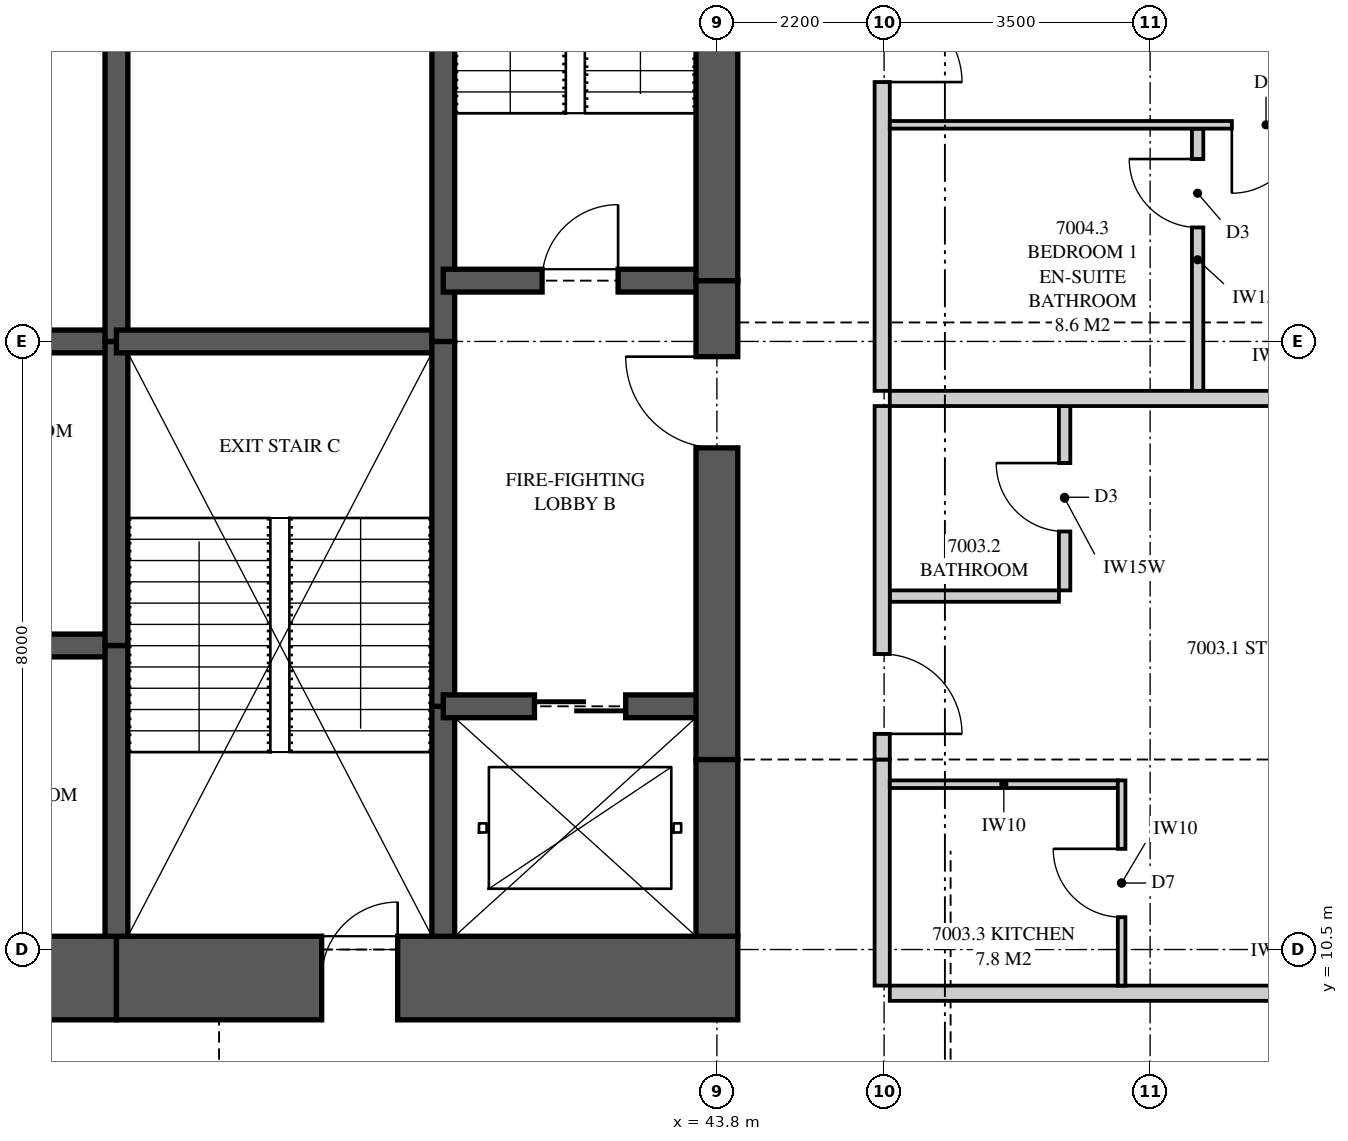
"""IFC4 building model, lengths in metres.
Left out: names, types, materials, properties, quantities, classifications, styles, units other than length and angle.
Written with IfcOpenShell. Run it as: python <this file> out.ifc"""

import sys

from ifc_helpers import new_model, si_unit, direction, frame, frame_2d, origin, place, context, subcontext, project, spatial, polyline, rectangle, outline, extrude, element, fill, save


model = new_model("IFC4")
c1 = context("Model", 3, precision=1e-05, world=origin(), true_north=direction((0.0, 1.0)))
c2 = subcontext(c1, "Body", "Model", "MODEL_VIEW")
j1 = project(units=[si_unit("LENGTHUNIT", "METRE"), si_unit("PLANEANGLEUNIT", "RADIAN")], contexts=[c1])
p1 = place(None, origin())
s1 = spatial("IfcSite", under=j1, at=p1, CompositionType="ELEMENT")
p2 = place(p1, origin())
s2 = spatial("IfcBuilding", under=s1, at=p2, CompositionType="ELEMENT")
p3 = place(p2, frame((0.0, 0.0, 256.45)))
s3 = spatial("IfcBuildingStorey", under=s2, at=p3, CompositionType="ELEMENT", Elevation=256.45)
p4 = place(p3, frame((31.6, 10.125, 0.0), z_axis=(0.0, 0.0, 1.0), x_axis=(1.0, 0.0, 0.0)))
e1 = element("IfcWall", 1, at=p4, inside=s3, PredefinedType="SHEAR", context=c2, shape_type="SweptSolid", body=[
    extrude(rectangle(XDim=4.3, YDim=1.1, at=frame_2d((2.15, 0.0))), origin(), (0.0, 0.0, 1.0), 3.5),
])
p5 = place(p3, frame((35.9, 10.125, 0.0), z_axis=(0.0, 0.0, 1.0), x_axis=(1.0, 0.0, 0.0)))
e2 = element("IfcWall", 2, at=p5, inside=s3, PredefinedType="SHEAR", context=c2, shape_type="SweptSolid", body=[
    extrude(rectangle(XDim=8.175, YDim=1.1, at=frame_2d((4.087, 0.0))), origin(), (0.0, 0.0, 1.0), 3.5),
])
p6 = place(p5, frame((2.7, 0.0, 0.0)))
e3 = element("IfcOpeningElement", 3, at=p6, cuts=e2, PredefinedType="OPENING", context=c2, shape_type="SweptSolid", body=[
    extrude(rectangle(XDim=1.0, YDim=2.1, at=frame_2d((0.5, 1.05))), frame((0.0, 0.56, 0.0), z_axis=(0.0, -1.0, 0.0), x_axis=(1.0, 0.0, 0.0)), (0.0, 0.0, 1.0), 1.12),
])
p7 = place(p3, frame((43.8, 10.675, 0.0), z_axis=(0.0, 0.0, 1.0), x_axis=(0.0, 1.0, 0.0)))
e4 = element("IfcWall", 4, at=p7, inside=s3, PredefinedType="SHEAR", context=c2, shape_type="SweptSolid", body=[
    extrude(rectangle(XDim=2.325, YDim=0.55, at=frame_2d((1.163, 0.0))), origin(), (0.0, 0.0, 1.0), 3.5),
])
p8 = place(p3, frame((43.8, 13.0, 0.0), z_axis=(0.0, 0.0, 1.0), x_axis=(0.0, 1.0, 0.0)))
e5 = element("IfcWall", 5, at=p8, inside=s3, PredefinedType="SHEAR", context=c2, shape_type="SweptSolid", body=[
    extrude(rectangle(XDim=6.3, YDim=0.55, at=frame_2d((3.15, 0.0))), origin(), (0.0, 0.0, 1.0), 3.5),
])
p9 = place(p8, frame((4.1, 0.0, 0.0)))
e6 = element("IfcOpeningElement", 6, at=p9, cuts=e5, PredefinedType="OPENING", context=c2, shape_type="SweptSolid", body=[
    extrude(rectangle(XDim=1.2, YDim=2.2, at=frame_2d((0.6, 1.1))), frame((0.0, 0.285, 0.0), z_axis=(0.0, -1.0, 0.0), x_axis=(1.0, 0.0, 0.0)), (0.0, 0.0, 1.0), 0.57),
])
p10 = place(p3, frame((43.8, 19.3, 0.0), z_axis=(0.0, 0.0, 1.0), x_axis=(0.0, 1.0, 0.0)))
e7 = element("IfcWall", 7, at=p10, inside=s3, PredefinedType="SHEAR", context=c2, shape_type="SweptSolid", body=[
    extrude(rectangle(XDim=7.025, YDim=0.55, at=frame_2d((3.512, 0.0))), origin(), (0.0, 0.0, 1.0), 3.5),
])
p11 = place(p3, frame((35.9, 10.675, 0.0), z_axis=(0.0, 0.0, 1.0), x_axis=(0.0, 1.0, 0.0)))
e8 = element("IfcWall", 8, at=p11, inside=s3, PredefinedType="SHEAR", context=c2, shape_type="SweptSolid", body=[
    extrude(rectangle(XDim=3.825, YDim=0.3, at=frame_2d((1.913, 0.0))), origin(), (0.0, 0.0, 1.0), 3.5),
])
for number, where, z_axis, x_axis in (
    (9, (35.9, 14.5, 0.0), (0.0, 0.0, 1.0), (0.0, 1.0, 0.0)),
    (10, (35.9, 18.5, 0.0), (0.0, 0.0, 1.0), (0.0, 1.0, 0.0)),
):
    element("IfcWall", number, at=place(p3, frame(where, z_axis=z_axis, x_axis=x_axis)), inside=s3, PredefinedType="SHEAR", context=c2, shape_type="SweptSolid", body=[
        extrude(rectangle(XDim=4.0, YDim=0.3, at=frame_2d((2.0, 0.0))), origin(), (0.0, 0.0, 1.0), 3.5),
    ])
p12 = place(p3, frame((40.2, 10.675, 0.0), z_axis=(0.0, 0.0, 1.0), x_axis=(0.0, 1.0, 0.0)))
e11 = element("IfcWall", 11, at=p12, inside=s3, PredefinedType="SHEAR", context=c2, shape_type="SweptSolid", body=[
    extrude(rectangle(XDim=3.025, YDim=0.3, at=frame_2d((1.512, 0.0))), origin(), (0.0, 0.0, 1.0), 3.5),
])
p13 = place(p3, frame((40.2, 13.7, 0.0), z_axis=(0.0, 0.0, 1.0), x_axis=(0.0, 1.0, 0.0)))
e12 = element("IfcWall", 12, at=p13, inside=s3, PredefinedType="SHEAR", context=c2, shape_type="SweptSolid", body=[
    extrude(rectangle(XDim=4.8, YDim=0.3, at=frame_2d((2.4, 0.0))), origin(), (0.0, 0.0, 1.0), 3.5),
])
p14 = place(p3, frame((40.2, 18.5, 0.0), z_axis=(0.0, 0.0, 1.0), x_axis=(0.0, 1.0, 0.0)))
e13 = element("IfcWall", 13, at=p14, inside=s3, PredefinedType="SHEAR", context=c2, shape_type="SweptSolid", body=[
    extrude(rectangle(XDim=7.825, YDim=0.3, at=frame_2d((3.913, 0.0))), origin(), (0.0, 0.0, 1.0), 3.5),
])
for number, where, z_axis, x_axis in (
    (14, (31.6, 14.5, 0.0), (0.0, 0.0, 1.0), (1.0, 0.0, 0.0)),
    (15, (31.6, 18.5, 0.0), (0.0, 0.0, 1.0), (1.0, 0.0, 0.0)),
):
    element("IfcWall", number, at=place(p3, frame(where, z_axis=z_axis, x_axis=x_axis)), inside=s3, PredefinedType="SHEAR", context=c2, shape_type="SweptSolid", body=[
        extrude(rectangle(XDim=4.3, YDim=0.3, at=frame_2d((2.15, 0.0))), origin(), (0.0, 0.0, 1.0), 3.5),
    ])
p15 = place(p3, frame((35.9, 18.5, 0.0), z_axis=(0.0, 0.0, 1.0), x_axis=(1.0, 0.0, 0.0)))
e16 = element("IfcWall", 16, at=p15, inside=s3, PredefinedType="SHEAR", context=c2, shape_type="SweptSolid", body=[
    extrude(rectangle(XDim=4.3, YDim=0.3, at=frame_2d((2.15, 0.0))), origin(), (0.0, 0.0, 1.0), 3.5),
])
p16 = place(p3, frame((40.2, 13.7, 0.0), z_axis=(0.0, 0.0, 1.0), x_axis=(1.0, 0.0, 0.0)))
e17 = element("IfcWall", 17, at=p16, inside=s3, PredefinedType="SHEAR", context=c2, shape_type="SweptSolid", body=[
    extrude(rectangle(XDim=3.6, YDim=0.3, at=frame_2d((1.8, 0.0))), origin(), (0.0, 0.0, 1.0), 3.5),
])
p17 = place(p16, frame((1.2, 0.0, 0.0)))
e18 = element("IfcOpeningElement", 18, at=p17, cuts=e17, PredefinedType="OPENING", context=c2, shape_type="SweptSolid", body=[
    extrude(rectangle(XDim=1.2, YDim=2.1, at=frame_2d((0.6, 1.05))), frame((0.0, 0.16, 0.0), z_axis=(0.0, -1.0, 0.0), x_axis=(1.0, 0.0, 0.0)), (0.0, 0.0, 1.0), 0.32),
])
p18 = place(p3, frame((40.2, 19.3, 0.0), z_axis=(0.0, 0.0, 1.0), x_axis=(1.0, 0.0, 0.0)))
e19 = element("IfcWall", 19, at=p18, inside=s3, PredefinedType="SHEAR", context=c2, shape_type="SweptSolid", body=[
    extrude(rectangle(XDim=3.6, YDim=0.3, at=frame_2d((1.8, 0.0))), origin(), (0.0, 0.0, 1.0), 3.5),
])
p19 = place(p18, frame((1.3, 0.0, 0.0)))
e20 = element("IfcOpeningElement", 20, at=p19, cuts=e19, PredefinedType="OPENING", context=c2, shape_type="SweptSolid", body=[
    extrude(rectangle(XDim=1.0, YDim=2.1, at=frame_2d((0.5, 1.05))), frame((0.0, 0.16, 0.0), z_axis=(0.0, -1.0, 0.0), x_axis=(1.0, 0.0, 0.0)), (0.0, 0.0, 1.0), 0.32),
])
p20 = place(p3, frame((46.075, 9.925, 0.0), z_axis=(0.0, 0.0, 1.0), x_axis=(1.0, 0.0, 0.0)))
e21 = element("IfcWall", 21, at=p20, inside=s3, PredefinedType="PARTITIONING", context=c2, shape_type="SweptSolid", body=[
    extrude(outline(polyline([(0.0, 0.0), (10.25, 0.0), (10.25, 3.26), (10.033, 3.26), (10.033, 2.3), (8.201, 2.3), (8.201, 3.26), (2.11, 3.26), (2.11, 2.66), (0.0, 2.66), (0.0, 3.26), (0.0, 0.0)])), frame((0.0, 0.1, 0.0), z_axis=(0.0, -1.0, 0.0), x_axis=(1.0, 0.0, 0.0)), (0.0, 0.0, 1.0), 0.2),
])
p21 = place(p3, frame((56.325, 17.75, 0.0), z_axis=(0.0, 0.0, 1.0), x_axis=(-1.0, 0.0, 0.0)))
e22 = element("IfcWall", 22, at=p21, inside=s3, PredefinedType="PARTITIONING", context=c2, shape_type="SweptSolid", body=[
    extrude(outline(polyline([(0.0, 0.0), (10.25, 0.0), (10.25, 3.26), (10.25, 2.66), (1.685, 2.66), (1.685, 2.3), (0.0, 2.3), (0.0, 3.26), (0.0, 0.0)])), frame((0.0, 0.1, 0.0), z_axis=(0.0, -1.0, 0.0), x_axis=(1.0, 0.0, 0.0)), (0.0, 0.0, 1.0), 0.2),
])
p22 = place(p3, frame((45.975, 10.025, 0.0), z_axis=(0.0, 0.0, 1.0), x_axis=(0.0, 1.0, 0.0)))
e23 = element("IfcWall", 23, at=p22, inside=s3, PredefinedType="PARTITIONING", context=c2, shape_type="SweptSolid", body=[
    extrude(rectangle(XDim=2.975, YDim=0.2, at=frame_2d((1.488, 0.0))), origin(), (0.0, 0.0, 1.0), 2.66),
])
p23 = place(p3, frame((45.975, 13.0, 0.0), z_axis=(0.0, 0.0, 1.0), x_axis=(0.0, 1.0, 0.0)))
e24 = element("IfcWall", 24, at=p23, inside=s3, PredefinedType="PARTITIONING", context=c2, shape_type="SweptSolid", body=[
    extrude(outline(polyline([(0.0, 0.0), (4.65, 0.0), (4.65, 2.66), (4.44, 2.66), (4.44, 3.26), (1.31, 3.26), (1.31, 2.66), (0.0, 2.66), (0.0, 0.0)])), frame((0.0, 0.1, 0.0), z_axis=(0.0, -1.0, 0.0), x_axis=(1.0, 0.0, 0.0)), (0.0, 0.0, 1.0), 0.2),
])
p24 = place(p23, frame((0.337, 0.0, 0.0)))
e25 = element("IfcOpeningElement", 25, at=p24, cuts=e24, PredefinedType="OPENING", context=c2, shape_type="SweptSolid", body=[
    extrude(rectangle(XDim=1.05, YDim=2.2, at=frame_2d((0.525, 1.1))), frame((0.0, 0.11, 0.0), z_axis=(0.0, -1.0, 0.0), x_axis=(1.0, 0.0, 0.0)), (0.0, 0.0, 1.0), 0.22),
])
p25 = place(p3, frame((48.375, 15.225, 0.0), z_axis=(0.0, 0.0, 1.0), x_axis=(0.0, 1.0, 0.0)))
e26 = element("IfcWall", 26, at=p25, inside=s3, PredefinedType="PLUMBINGWALL", context=c2, shape_type="SweptSolid", body=[
    extrude(outline(polyline([(0.0, 0.0), (2.425, 0.0), (2.425, 3.26), (2.425, 2.66), (2.24, 2.66), (2.24, 3.26), (0.0, 3.26), (0.0, 0.0)])), frame((0.0, 0.075, 0.0), z_axis=(0.0, -1.0, 0.0), x_axis=(1.0, 0.0, 0.0)), (0.0, 0.0, 1.0), 0.15),
])
p26 = place(p25, frame((0.775, 0.0, 0.0)))
e27 = element("IfcOpeningElement", 27, at=p26, cuts=e26, PredefinedType="OPENING", context=c2, shape_type="SweptSolid", body=[
    extrude(rectangle(XDim=0.9, YDim=2.1, at=frame_2d((0.45, 1.05))), frame((0.0, 0.085, 0.0), z_axis=(0.0, -1.0, 0.0), x_axis=(1.0, 0.0, 0.0)), (0.0, 0.0, 1.0), 0.17),
])
p27 = place(p3, frame((48.3, 15.15, 0.0), z_axis=(0.0, 0.0, 1.0), x_axis=(-1.0, 0.0, 0.0)))
e28 = element("IfcWall", 28, at=p27, inside=s3, PredefinedType="PLUMBINGWALL", context=c2, shape_type="SweptSolid", body=[
    extrude(rectangle(XDim=2.225, YDim=0.15, at=frame_2d((1.113, 0.0))), origin(), (0.0, 0.0, 1.0), 3.26),
])
p28 = place(p3, frame((45.975, 17.85, 0.0), z_axis=(0.0, 0.0, 1.0), x_axis=(0.0, 1.0, 0.0)))
e29 = element("IfcWall", 29, at=p28, inside=s3, PredefinedType="PARTITIONING", context=c2, shape_type="SweptSolid", body=[
    extrude(outline(polyline([(0.0, 0.0), (7.15, 0.0), (7.15, 2.66), (5.84, 2.66), (5.84, 3.26), (2.21, 3.26), (2.21, 2.66), (0.0, 2.66), (0.0, 0.0)])), frame((0.0, 0.1, 0.0), z_axis=(0.0, -1.0, 0.0), x_axis=(1.0, 0.0, 0.0)), (0.0, 0.0, 1.0), 0.2),
])
p29 = place(p28, frame((4.062, 0.0, 0.0)))
e30 = element("IfcOpeningElement", 30, at=p29, cuts=e29, PredefinedType="OPENING", context=c2, shape_type="SweptSolid", body=[
    extrude(rectangle(XDim=1.05, YDim=2.2, at=frame_2d((0.525, 1.1))), frame((0.0, 0.11, 0.0), z_axis=(0.0, -1.0, 0.0), x_axis=(1.0, 0.0, 0.0)), (0.0, 0.0, 1.0), 0.22),
])
p30 = place(p3, frame((56.325, 21.35, 0.0), z_axis=(0.0, 0.0, 1.0), x_axis=(-1.0, 0.0, 0.0)))
e31 = element("IfcWall", 31, at=p30, inside=s3, PredefinedType="PARTITIONING", context=c2, shape_type="SweptSolid", body=[
    extrude(outline(polyline([(0.0, 0.0), (10.25, 0.0), (10.25, 3.26), (1.635, 3.26), (1.635, 2.3), (0.0, 2.3), (0.0, 3.26), (0.0, 0.0)])), frame((0.0, 0.05, 0.0), z_axis=(0.0, -1.0, 0.0), x_axis=(1.0, 0.0, 0.0)), (0.0, 0.0, 1.0), 0.1),
])
p31 = place(p30, frame((4.85, 0.0, 0.0)))
e32 = element("IfcOpeningElement", 32, at=p31, cuts=e31, PredefinedType="OPENING", context=c2, shape_type="SweptSolid", body=[
    extrude(rectangle(XDim=0.9, YDim=2.1, at=frame_2d((0.45, 1.05))), frame((0.0, 0.06, 0.0), z_axis=(0.0, -1.0, 0.0), x_axis=(1.0, 0.0, 0.0)), (0.0, 0.0, 1.0), 0.12),
])
p32 = place(p3, frame((50.125, 17.85, 0.0), z_axis=(0.0, 0.0, 1.0), x_axis=(0.0, 1.0, 0.0)))
e33 = element("IfcWall", 33, at=p32, inside=s3, PredefinedType="PLUMBINGWALL", context=c2, shape_type="SweptSolid", body=[
    extrude(outline(polyline([(0.0, 0.0), (3.45, 0.0), (3.45, 3.26), (2.185, 3.26), (2.185, 2.66), (0.0, 2.66), (0.0, 3.26), (0.0, 0.0)])), frame((0.0, 0.075, 0.0), z_axis=(0.0, -1.0, 0.0), x_axis=(1.0, 0.0, 0.0)), (0.0, 0.0, 1.0), 0.15),
])
p33 = place(p32, frame((2.15, 0.0, 0.0)))
e34 = element("IfcOpeningElement", 34, at=p33, cuts=e33, PredefinedType="OPENING", context=c2, shape_type="SweptSolid", body=[
    extrude(rectangle(XDim=0.9, YDim=2.1, at=frame_2d((0.45, 1.05))), frame((0.0, 0.085, 0.0), z_axis=(0.0, -1.0, 0.0), x_axis=(1.0, 0.0, 0.0)), (0.0, 0.0, 1.0), 0.17),
])
p34 = place(p3, frame((49.125, 10.025, 0.0), z_axis=(0.0, 0.0, 1.0), x_axis=(0.0, 1.0, 0.0)))
e35 = element("IfcWall", 35, at=p34, inside=s3, PredefinedType="PARTITIONING", context=c2, shape_type="SweptSolid", body=[
    extrude(outline(polyline([(0.0, 0.0), (2.7, 0.0), (2.7, 3.26), (2.7, 2.66), (1.715, 2.66), (1.715, 3.26), (0.0, 3.26), (0.0, 0.0)])), frame((0.0, 0.05, 0.0), z_axis=(0.0, -1.0, 0.0), x_axis=(1.0, 0.0, 0.0)), (0.0, 0.0, 1.0), 0.1),
])
p35 = place(p34, frame((0.9, 0.0, 0.0)))
e36 = element("IfcOpeningElement", 36, at=p35, cuts=e35, PredefinedType="OPENING", context=c2, shape_type="SweptSolid", body=[
    extrude(rectangle(XDim=0.9, YDim=2.1, at=frame_2d((0.45, 1.05))), frame((0.0, 0.06, 0.0), z_axis=(0.0, -1.0, 0.0), x_axis=(1.0, 0.0, 0.0)), (0.0, 0.0, 1.0), 0.12),
])
p36 = place(p3, frame((46.075, 12.675, 0.0), z_axis=(0.0, 0.0, 1.0), x_axis=(1.0, 0.0, 0.0)))
e37 = element("IfcWall", 37, at=p36, inside=s3, PredefinedType="PARTITIONING", context=c2, shape_type="SweptSolid", body=[
    extrude(outline(polyline([(0.0, 0.0), (3.0, 0.0), (3.0, 3.26), (3.0, 2.66), (2.06, 2.66), (0.0, 2.66), (0.0, 3.26), (0.0, 0.0)])), frame((0.0, 0.05, 0.0), z_axis=(0.0, -1.0, 0.0), x_axis=(1.0, 0.0, 0.0)), (0.0, 0.0, 1.0), 0.1),
])
p37 = place(p24, frame((1.05, 0.0, 0.0), z_axis=(0.0, 0.0, 1.0), x_axis=(-1.0, 0.0, 0.0)))
e38 = element("IfcDoor", 38, at=p37, inside=s3, OperationType="SINGLE_SWING_RIGHT", PredefinedType="DOOR", context=c2, shape_type="SweptSolid", body=[
    extrude(rectangle(XDim=1.05, YDim=2.2, at=frame_2d((0.525, 1.1))), frame((0.0, 0.025, 0.0), z_axis=(0.0, -1.0, 0.0), x_axis=(1.0, 0.0, 0.0)), (0.0, 0.0, 1.0), 0.05),
])
fill(e25, e38)
p38 = place(p26, origin())
e39 = element("IfcDoor", 39, at=p38, inside=s3, OperationType="SINGLE_SWING_RIGHT", PredefinedType="DOOR", context=c2, shape_type="SweptSolid", body=[
    extrude(rectangle(XDim=0.9, YDim=2.1, at=frame_2d((0.45, 1.05))), frame((0.0, 0.025, 0.0), z_axis=(0.0, -1.0, 0.0), x_axis=(1.0, 0.0, 0.0)), (0.0, 0.0, 1.0), 0.05),
])
fill(e27, e39)
p39 = place(p29, frame((1.05, 0.0, 0.0), z_axis=(0.0, 0.0, 1.0), x_axis=(-1.0, 0.0, 0.0)))
e40 = element("IfcDoor", 40, at=p39, inside=s3, OperationType="SINGLE_SWING_RIGHT", PredefinedType="DOOR", context=c2, shape_type="SweptSolid", body=[
    extrude(rectangle(XDim=1.05, YDim=2.2, at=frame_2d((0.525, 1.1))), frame((0.0, 0.025, 0.0), z_axis=(0.0, -1.0, 0.0), x_axis=(1.0, 0.0, 0.0)), (0.0, 0.0, 1.0), 0.05),
])
fill(e30, e40)
p40 = place(p31, origin())
e41 = element("IfcDoor", 41, at=p40, inside=s3, OperationType="SINGLE_SWING_RIGHT", PredefinedType="DOOR", context=c2, shape_type="SweptSolid", body=[
    extrude(rectangle(XDim=0.9, YDim=2.1, at=frame_2d((0.45, 1.05))), frame((0.0, 0.025, 0.0), z_axis=(0.0, -1.0, 0.0), x_axis=(1.0, 0.0, 0.0)), (0.0, 0.0, 1.0), 0.05),
])
fill(e32, e41)
p41 = place(p33, origin())
e42 = element("IfcDoor", 42, at=p41, inside=s3, OperationType="SINGLE_SWING_RIGHT", PredefinedType="DOOR", context=c2, shape_type="SweptSolid", body=[
    extrude(rectangle(XDim=0.9, YDim=2.1, at=frame_2d((0.45, 1.05))), frame((0.0, 0.025, 0.0), z_axis=(0.0, -1.0, 0.0), x_axis=(1.0, 0.0, 0.0)), (0.0, 0.0, 1.0), 0.05),
])
fill(e34, e42)
p42 = place(p35, origin())
e43 = element("IfcDoor", 43, at=p42, inside=s3, OperationType="SINGLE_SWING_RIGHT", PredefinedType="DOOR", context=c2, shape_type="SweptSolid", body=[
    extrude(rectangle(XDim=0.9, YDim=2.1, at=frame_2d((0.45, 1.05))), frame((0.0, 0.025, 0.0), z_axis=(0.0, -1.0, 0.0), x_axis=(1.0, 0.0, 0.0)), (0.0, 0.0, 1.0), 0.05),
])
fill(e36, e43)
p43 = place(p19, origin())
e44 = element("IfcDoor", 44, at=p43, inside=s3, OperationType="SINGLE_SWING_RIGHT", PredefinedType="DOOR", context=c2, shape_type="SweptSolid", body=[
    extrude(rectangle(XDim=1.0, YDim=2.1, at=frame_2d((0.5, 1.05))), frame((0.0, 0.025, 0.0), z_axis=(0.0, -1.0, 0.0), x_axis=(1.0, 0.0, 0.0)), (0.0, 0.0, 1.0), 0.05),
])
fill(e20, e44)
p44 = place(p9, origin())
e45 = element("IfcDoor", 45, at=p44, inside=s3, OperationType="SINGLE_SWING_RIGHT", PredefinedType="DOOR", context=c2, shape_type="SweptSolid", body=[
    extrude(rectangle(XDim=1.2, YDim=2.2, at=frame_2d((0.6, 1.1))), frame((0.0, 0.025, 0.0), z_axis=(0.0, -1.0, 0.0), x_axis=(1.0, 0.0, 0.0)), (0.0, 0.0, 1.0), 0.05),
])
fill(e6, e45)
p45 = place(p17, origin())
e46 = element("IfcDoor", 46, at=p45, inside=s3, OperationType="SLIDING_TO_LEFT", PredefinedType="DOOR", context=c2, shape_type="SweptSolid", body=[
    extrude(rectangle(XDim=1.2, YDim=2.1, at=frame_2d((0.6, 1.05))), frame((0.0, 0.025, 0.0), z_axis=(0.0, -1.0, 0.0), x_axis=(1.0, 0.0, 0.0)), (0.0, 0.0, 1.0), 0.05),
])
fill(e18, e46)
p46 = place(p6, origin())
e47 = element("IfcDoor", 47, at=p46, inside=s3, OperationType="SINGLE_SWING_RIGHT", PredefinedType="DOOR", context=c2, shape_type="SweptSolid", body=[
    extrude(rectangle(XDim=1.0, YDim=2.1, at=frame_2d((0.5, 1.05))), frame((0.0, 0.025, 0.0), z_axis=(0.0, -1.0, 0.0), x_axis=(1.0, 0.0, 0.0)), (0.0, 0.0, 1.0), 0.05),
])
fill(e3, e47)
save(model, sys.argv[1])
